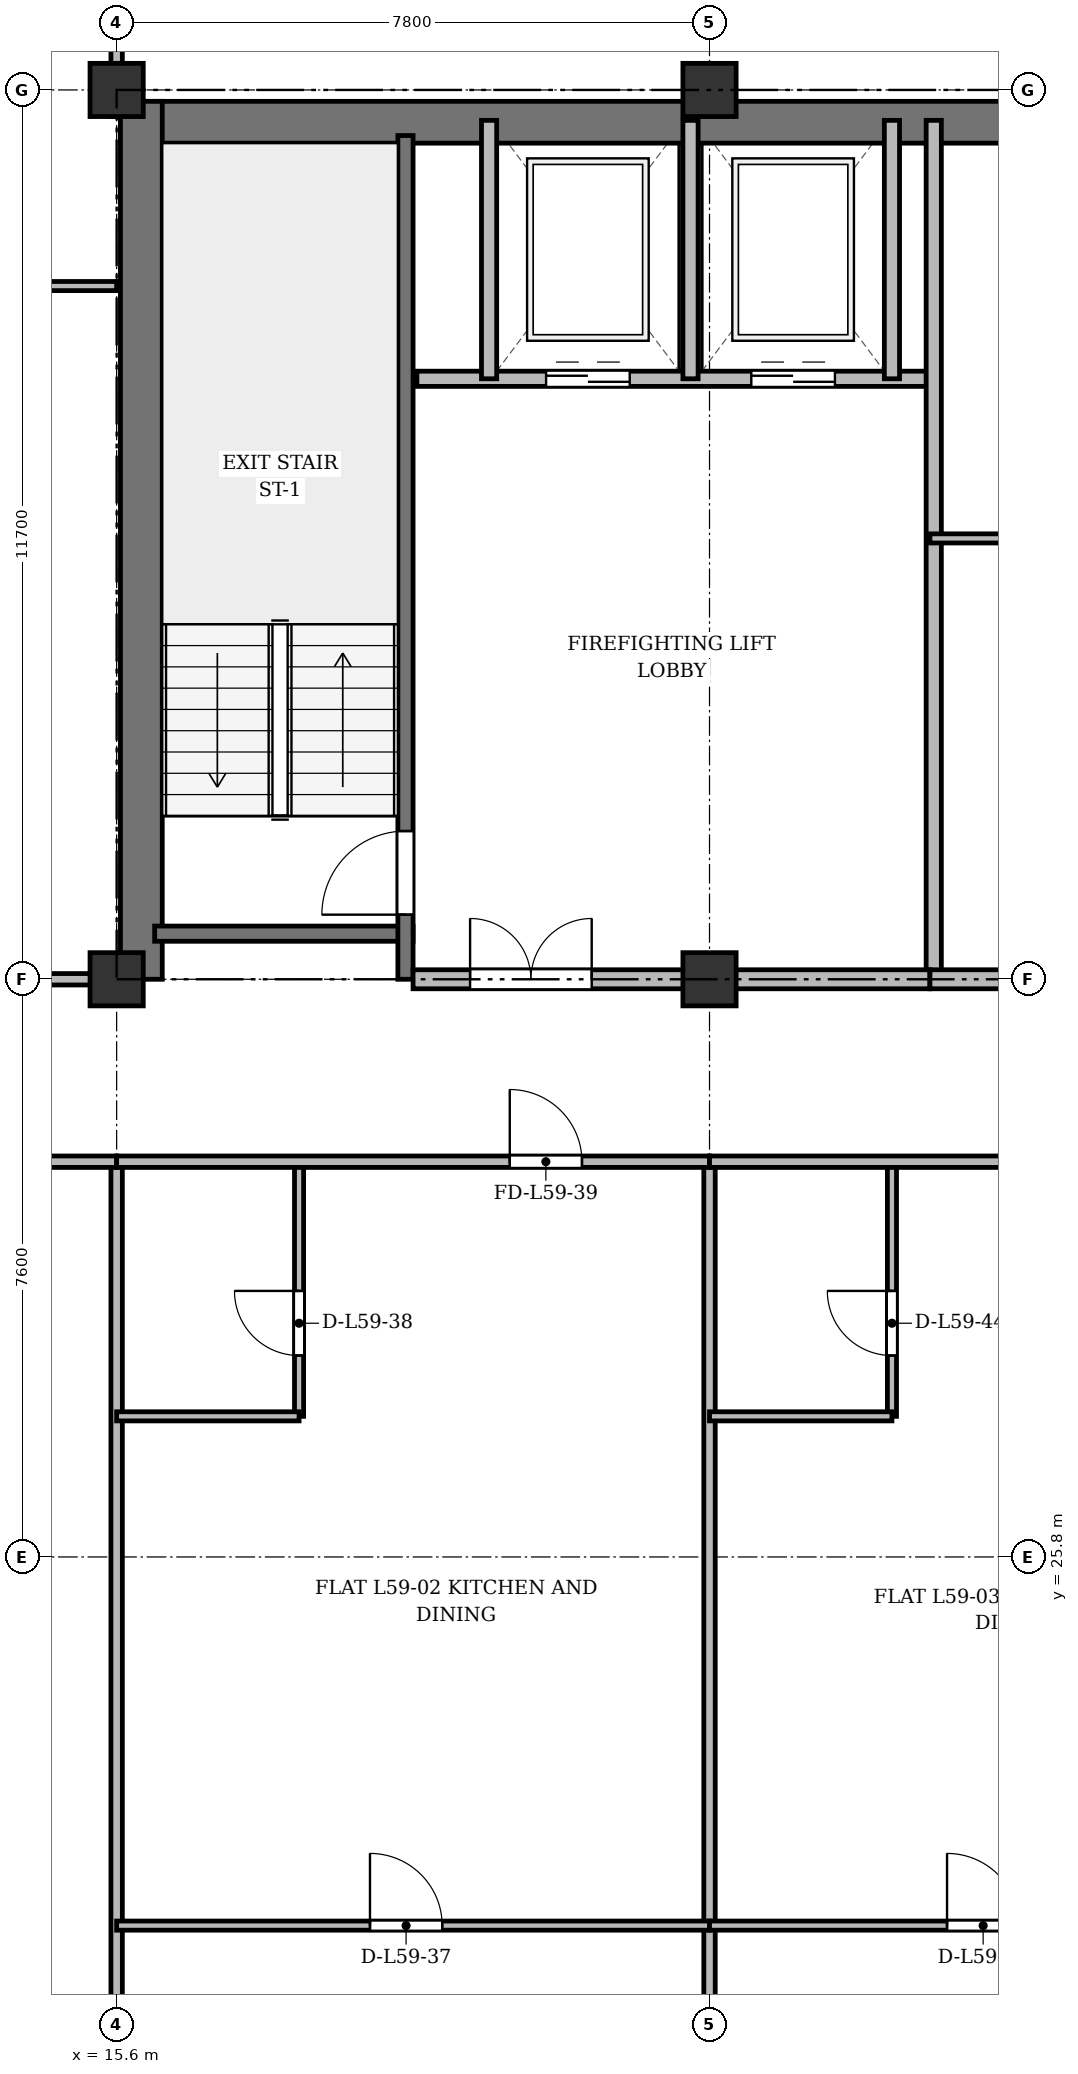
"""IFC4 building model, lengths in metres.
Left out: names, types, materials, properties, quantities, classifications, styles, units other than length and angle.
Written with IfcOpenShell. Run it as: python <this file> out.ifc"""

import sys

from ifc_helpers import new_model, si_unit, direction, frame, frame_2d, origin, origin_2d, place, context, subcontext, project, spatial, rectangle, extrude, source, transform, mapped, element, fill, save


model = new_model("IFC4")
c1 = context("Model", 3, precision=1e-05, world=origin(), true_north=direction((0.0, 1.0)))
c2 = subcontext(c1, "Body", "Model", "MODEL_VIEW")
j1 = project(units=[si_unit("LENGTHUNIT", "METRE"), si_unit("PLANEANGLEUNIT", "RADIAN")], contexts=[c1])
p1 = place(None, origin())
s1 = spatial("IfcSite", under=j1, at=p1, CompositionType="ELEMENT")
p2 = place(p1, origin())
s2 = spatial("IfcBuilding", under=s1, at=p2, CompositionType="ELEMENT")
p3 = place(p2, frame((0.0, 0.0, 226.5)))
s3 = spatial("IfcBuildingStorey", under=s2, at=p3, CompositionType="ELEMENT", Elevation=226.5)
m1 = source(origin(), c2, "Body", "SweptSolid", [
    extrude(rectangle(XDim=0.7, YDim=0.7, at=origin_2d()), origin(), (0.0, 0.0, 1.0), 3.6),
])
for number, where, z_axis, x_axis in (
    (1, (15.6, 33.4, 0.0), (0.0, 0.0, 1.0), (1.0, 0.0, 0.0)),
    (2, (15.6, 45.1, 0.0), (0.0, 0.0, 1.0), (1.0, 0.0, 0.0)),
    (3, (23.4, 33.4, 0.0), (0.0, 0.0, 1.0), (1.0, 0.0, 0.0)),
    (4, (23.4, 45.1, 0.0), (0.0, 0.0, 1.0), (1.0, 0.0, 0.0)),
):
    element("IfcColumn", number, at=place(p3, frame(where, z_axis=z_axis, x_axis=x_axis)), inside=s3, PredefinedType="COLUMN", context=c2, shape_type="MappedRepresentation", body=[
        mapped(m1, transform((0.0, 0.0, 0.0), x_axis=(1.0, 0.0, 0.0), y_axis=(0.0, 1.0, 0.0), z_axis=(0.0, 0.0, 1.0), scale=1.0)),
    ])
p4 = place(p3, frame((15.65, 44.675, 0.0), z_axis=(0.0, 0.0, 1.0), x_axis=(1.0, 0.0, 0.0)))
e5 = element("IfcWall", 5, at=p4, inside=s3, PredefinedType="SHEAR", context=c2, shape_type="SweptSolid", body=[
    extrude(rectangle(XDim=43.1, YDim=0.55, at=frame_2d((21.55, 0.0))), origin(), (0.0, 0.0, 1.0), 3.36),
])
p5 = place(p3, frame((15.925, 33.4, 0.0), z_axis=(0.0, 0.0, 1.0), x_axis=(0.0, 1.0, 0.0)))
e6 = element("IfcWall", 6, at=p5, inside=s3, PredefinedType="SHEAR", context=c2, shape_type="SweptSolid", body=[
    extrude(rectangle(XDim=11.55, YDim=0.55, at=frame_2d((5.775, 0.0))), origin(), (0.0, 0.0, 1.0), 3.36),
])
p6 = place(p3, frame((16.1, 34.0, 0.0), z_axis=(0.0, 0.0, 1.0), x_axis=(1.0, 0.0, 0.0)))
e7 = element("IfcWall", 7, at=p6, inside=s3, PredefinedType="SHEAR", context=c2, shape_type="SweptSolid", body=[
    extrude(rectangle(XDim=3.4, YDim=0.2, at=frame_2d((1.7, 0.0))), origin(), (0.0, 0.0, 1.0), 3.36),
])
p7 = place(p3, frame((19.4, 33.4, 0.0), z_axis=(0.0, 0.0, 1.0), x_axis=(0.0, 1.0, 0.0)))
e8 = element("IfcWall", 8, at=p7, inside=s3, PredefinedType="SHEAR", context=c2, shape_type="SweptSolid", body=[
    extrude(rectangle(XDim=11.1, YDim=0.2, at=frame_2d((5.55, 0.0))), origin(), (0.0, 0.0, 1.0), 3.36),
])
p8 = place(p7, frame((0.85, 0.0, 0.0)))
e9 = element("IfcOpeningElement", 9, at=p8, cuts=e8, PredefinedType="OPENING", context=c2, shape_type="SweptSolid", body=[
    extrude(rectangle(XDim=1.1, YDim=2.15, at=frame_2d((0.55, 1.075))), frame((0.0, 0.11, 0.0), z_axis=(0.0, -1.0, 0.0), x_axis=(1.0, 0.0, 0.0)), (0.0, 0.0, 1.0), 0.22),
])
p9 = place(p3, frame((19.55, 41.3, 0.0), z_axis=(0.0, 0.0, 1.0), x_axis=(1.0, 0.0, 0.0)))
e10 = element("IfcWall", 10, at=p9, inside=s3, PredefinedType="SOLIDWALL", context=c2, shape_type="SweptSolid", body=[
    extrude(rectangle(XDim=6.75, YDim=0.2, at=frame_2d((3.375, 0.0))), origin(), (0.0, 0.0, 1.0), 3.36),
])
p10 = place(p9, frame((1.7, 0.0, 0.0)))
e11 = element("IfcOpeningElement", 11, at=p10, cuts=e10, PredefinedType="OPENING", context=c2, shape_type="SweptSolid", body=[
    extrude(rectangle(XDim=1.1, YDim=2.15, at=frame_2d((0.55, 1.075))), frame((0.0, 0.11, 0.0), z_axis=(0.0, -1.0, 0.0), x_axis=(1.0, 0.0, 0.0)), (0.0, 0.0, 1.0), 0.22),
])
p11 = place(p9, frame((4.4, 0.0, 0.0)))
e12 = element("IfcOpeningElement", 12, at=p11, cuts=e10, PredefinedType="OPENING", context=c2, shape_type="SweptSolid", body=[
    extrude(rectangle(XDim=1.1, YDim=2.15, at=frame_2d((0.55, 1.075))), frame((0.0, 0.11, 0.0), z_axis=(0.0, -1.0, 0.0), x_axis=(1.0, 0.0, 0.0)), (0.0, 0.0, 1.0), 0.22),
])
for number, where, z_axis, x_axis in (
    (13, (20.5, 41.3, 0.0), (0.0, 0.0, 1.0), (0.0, 1.0, 0.0)),
    (14, (23.15, 41.3, 0.0), (0.0, 0.0, 1.0), (0.0, 1.0, 0.0)),
    (15, (25.8, 41.3, 0.0), (0.0, 0.0, 1.0), (0.0, 1.0, 0.0)),
):
    element("IfcWall", number, at=place(p3, frame(where, z_axis=z_axis, x_axis=x_axis)), inside=s3, PredefinedType="SOLIDWALL", context=c2, shape_type="SweptSolid", body=[
        extrude(rectangle(XDim=3.4, YDim=0.2, at=frame_2d((1.7, 0.0))), origin(), (0.0, 0.0, 1.0), 3.36),
    ])
p12 = place(p3, frame((26.35, 33.4, 0.0), z_axis=(0.0, 0.0, 1.0), x_axis=(0.0, 1.0, 0.0)))
e16 = element("IfcWall", 16, at=p12, inside=s3, PredefinedType="SOLIDWALL", context=c2, shape_type="SweptSolid", body=[
    extrude(rectangle(XDim=11.3, YDim=0.2, at=frame_2d((5.65, 0.0))), origin(), (0.0, 0.0, 1.0), 2.91),
])
p13 = place(p3, frame((19.5, 33.4, 0.0), z_axis=(0.0, 0.0, 1.0), x_axis=(1.0, 0.0, 0.0)))
e17 = element("IfcWall", 17, at=p13, inside=s3, PredefinedType="PARTITIONING", context=c2, shape_type="SweptSolid", body=[
    extrude(rectangle(XDim=6.8, YDim=0.25, at=frame_2d((3.4, 0.0))), origin(), (0.0, 0.0, 1.0), 2.91),
])
p14 = place(p13, frame((0.75, 0.0, 0.0)))
e18 = element("IfcOpeningElement", 18, at=p14, cuts=e17, PredefinedType="OPENING", context=c2, shape_type="SweptSolid", body=[
    extrude(rectangle(XDim=1.6, YDim=2.2, at=frame_2d((0.8, 1.1))), frame((0.0, 0.135, 0.0), z_axis=(0.0, -1.0, 0.0), x_axis=(1.0, 0.0, 0.0)), (0.0, 0.0, 1.0), 0.27),
])
p15 = place(p3, frame((26.3, 39.2, 0.0), z_axis=(0.0, 0.0, 1.0), x_axis=(1.0, 0.0, 0.0)))
e19 = element("IfcWall", 19, at=p15, inside=s3, PredefinedType="PARTITIONING", context=c2, shape_type="SweptSolid", body=[
    extrude(rectangle(XDim=7.0, YDim=0.12, at=frame_2d((3.5, 0.0))), origin(), (0.0, 0.0, 1.0), 2.86),
])
p16 = place(p15, frame((2.6, 0.0, 0.0)))
e20 = element("IfcOpeningElement", 20, at=p16, cuts=e19, PredefinedType="OPENING", context=c2, shape_type="SweptSolid", body=[
    extrude(rectangle(XDim=0.95, YDim=2.15, at=frame_2d((0.475, 1.075))), frame((0.0, 0.07, 0.0), z_axis=(0.0, -1.0, 0.0), x_axis=(1.0, 0.0, 0.0)), (0.0, 0.0, 1.0), 0.14),
])
p17 = place(p3, frame((26.3, 33.4, 0.0), z_axis=(0.0, 0.0, 1.0), x_axis=(1.0, 0.0, 0.0)))
e21 = element("IfcWall", 21, at=p17, inside=s3, PredefinedType="PARTITIONING", context=c2, shape_type="SweptSolid", body=[
    extrude(rectangle(XDim=7.0, YDim=0.25, at=frame_2d((3.5, 0.0))), origin(), (0.0, 0.0, 1.0), 2.91),
])
p18 = place(p17, frame((1.35, 0.0, 0.0)))
e22 = element("IfcOpeningElement", 22, at=p18, cuts=e21, PredefinedType="OPENING", context=c2, shape_type="SweptSolid", body=[
    extrude(rectangle(XDim=0.95, YDim=2.15, at=frame_2d((0.475, 1.075))), frame((0.0, 0.135, 0.0), z_axis=(0.0, -1.0, 0.0), x_axis=(1.0, 0.0, 0.0)), (0.0, 0.0, 1.0), 0.27),
])
p19 = place(p3, frame((11.925, 42.52, 0.0), z_axis=(0.0, 0.0, 1.0), x_axis=(1.0, 0.0, 0.0)))
e23 = element("IfcWall", 23, at=p19, inside=s3, PredefinedType="PARTITIONING", context=c2, shape_type="SweptSolid", body=[
    extrude(rectangle(XDim=3.675, YDim=0.12, at=frame_2d((1.837, 0.0))), origin(), (0.0, 0.0, 1.0), 2.86),
])
p20 = place(p19, frame((1.362, 0.0, 0.0)))
e24 = element("IfcOpeningElement", 24, at=p20, cuts=e23, PredefinedType="OPENING", context=c2, shape_type="SweptSolid", body=[
    extrude(rectangle(XDim=0.95, YDim=2.15, at=frame_2d((0.475, 1.075))), frame((0.0, 0.07, 0.0), z_axis=(0.0, -1.0, 0.0), x_axis=(1.0, 0.0, 0.0)), (0.0, 0.0, 1.0), 0.14),
])
p21 = place(p3, frame((8.25, 33.4, 0.0), z_axis=(0.0, 0.0, 1.0), x_axis=(1.0, 0.0, 0.0)))
e25 = element("IfcWall", 25, at=p21, inside=s3, PredefinedType="PARTITIONING", context=c2, shape_type="SweptSolid", body=[
    extrude(rectangle(XDim=7.35, YDim=0.15, at=frame_2d((3.675, 0.0))), origin(), (0.0, 0.0, 1.0), 2.91),
])
p22 = place(p21, frame((4.275, 0.0, 0.0)))
e26 = element("IfcOpeningElement", 26, at=p22, cuts=e25, PredefinedType="OPENING", context=c2, shape_type="SweptSolid", body=[
    extrude(rectangle(XDim=0.95, YDim=2.15, at=frame_2d((0.475, 1.075))), frame((0.0, 0.085, 0.0), z_axis=(0.0, -1.0, 0.0), x_axis=(1.0, 0.0, 0.0)), (0.0, 0.0, 1.0), 0.17),
])
p23 = place(p3, frame((15.6, 44.75, 0.0), z_axis=(0.0, 0.0, 1.0), x_axis=(0.0, 1.0, 0.0)))
e27 = element("IfcWall", 27, at=p23, inside=s3, PredefinedType="PARTITIONING", context=c2, shape_type="SweptSolid", body=[
    extrude(rectangle(XDim=3.61, YDim=0.15, at=frame_2d((1.805, 0.0))), origin(), (0.0, 0.0, 1.0), 2.86),
])
p24 = place(p23, frame((1.1, 0.0, 0.0)))
e28 = element("IfcOpeningElement", 28, at=p24, cuts=e27, PredefinedType="OPENING", context=c2, shape_type="SweptSolid", body=[
    extrude(rectangle(XDim=0.95, YDim=2.15, at=frame_2d((0.475, 1.075))), frame((0.0, 0.085, 0.0), z_axis=(0.0, -1.0, 0.0), x_axis=(1.0, 0.0, 0.0)), (0.0, 0.0, 1.0), 0.17),
])
for number, where, z_axis, x_axis in (
    (29, (15.6, 3.625, 0.0), (0.0, 0.0, 1.0), (0.0, 1.0, 0.0)),
    (30, (23.4, 3.625, 0.0), (0.0, 0.0, 1.0), (0.0, 1.0, 0.0)),
):
    element("IfcWall", number, at=place(p3, frame(where, z_axis=z_axis, x_axis=x_axis)), inside=s3, PredefinedType="PARTITIONING", context=c2, shape_type="SweptSolid", body=[
        extrude(rectangle(XDim=27.375, YDim=0.15, at=frame_2d((13.688, 0.0))), origin(), (0.0, 0.0, 1.0), 2.86),
    ])
p25 = place(p3, frame((8.225, 31.0, 0.0), z_axis=(0.0, 0.0, 1.0), x_axis=(1.0, 0.0, 0.0)))
e31 = element("IfcWall", 31, at=p25, inside=s3, PredefinedType="PARTITIONING", context=c2, shape_type="SweptSolid", body=[
    extrude(rectangle(XDim=7.375, YDim=0.15, at=frame_2d((3.688, 0.0))), origin(), (0.0, 0.0, 1.0), 2.86),
])
p26 = place(p25, frame((4.877, 0.0, 0.0)))
e32 = element("IfcOpeningElement", 32, at=p26, cuts=e31, PredefinedType="OPENING", context=c2, shape_type="SweptSolid", body=[
    extrude(rectangle(XDim=0.95, YDim=2.15, at=frame_2d((0.475, 1.075))), frame((0.0, 0.085, 0.0), z_axis=(0.0, -1.0, 0.0), x_axis=(1.0, 0.0, 0.0)), (0.0, 0.0, 1.0), 0.17),
])
p27 = place(p3, frame((15.6, 20.95, 0.0), z_axis=(0.0, 0.0, 1.0), x_axis=(1.0, 0.0, 0.0)))
e33 = element("IfcWall", 33, at=p27, inside=s3, PredefinedType="PARTITIONING", context=c2, shape_type="SweptSolid", body=[
    extrude(rectangle(XDim=7.8, YDim=0.12, at=frame_2d((3.9, 0.0))), origin(), (0.0, 0.0, 1.0), 2.86),
])
p28 = place(p27, frame((3.333, 0.0, 0.0)))
e34 = element("IfcOpeningElement", 34, at=p28, cuts=e33, PredefinedType="OPENING", context=c2, shape_type="SweptSolid", body=[
    extrude(rectangle(XDim=0.95, YDim=2.15, at=frame_2d((0.475, 1.075))), frame((0.0, 0.07, 0.0), z_axis=(0.0, -1.0, 0.0), x_axis=(1.0, 0.0, 0.0)), (0.0, 0.0, 1.0), 0.14),
])
p29 = place(p3, frame((18.0, 27.65, 0.0), z_axis=(0.0, 0.0, 1.0), x_axis=(0.0, 1.0, 0.0)))
e35 = element("IfcWall", 35, at=p29, inside=s3, PredefinedType="PARTITIONING", context=c2, shape_type="SweptSolid", body=[
    extrude(rectangle(XDim=3.35, YDim=0.12, at=frame_2d((1.675, 0.0))), origin(), (0.0, 0.0, 1.0), 3.36),
])
p30 = place(p29, frame((0.8, 0.0, 0.0)))
e36 = element("IfcOpeningElement", 36, at=p30, cuts=e35, PredefinedType="OPENING", context=c2, shape_type="SweptSolid", body=[
    extrude(rectangle(XDim=0.85, YDim=2.1, at=frame_2d((0.425, 1.05))), frame((0.0, 0.07, 0.0), z_axis=(0.0, -1.0, 0.0), x_axis=(1.0, 0.0, 0.0)), (0.0, 0.0, 1.0), 0.14),
])
p31 = place(p3, frame((15.6, 27.65, 0.0), z_axis=(0.0, 0.0, 1.0), x_axis=(1.0, 0.0, 0.0)))
e37 = element("IfcWall", 37, at=p31, inside=s3, PredefinedType="PARTITIONING", context=c2, shape_type="SweptSolid", body=[
    extrude(rectangle(XDim=2.4, YDim=0.12, at=frame_2d((1.2, 0.0))), origin(), (0.0, 0.0, 1.0), 2.86),
])
p32 = place(p3, frame((15.6, 31.0, 0.0), z_axis=(0.0, 0.0, 1.0), x_axis=(1.0, 0.0, 0.0)))
e38 = element("IfcWall", 38, at=p32, inside=s3, PredefinedType="PARTITIONING", context=c2, shape_type="SweptSolid", body=[
    extrude(rectangle(XDim=7.8, YDim=0.15, at=frame_2d((3.9, 0.0))), origin(), (0.0, 0.0, 1.0), 2.86),
])
p33 = place(p32, frame((5.172, 0.0, 0.0)))
e39 = element("IfcOpeningElement", 39, at=p33, cuts=e38, PredefinedType="OPENING", context=c2, shape_type="SweptSolid", body=[
    extrude(rectangle(XDim=0.95, YDim=2.15, at=frame_2d((0.475, 1.075))), frame((0.0, 0.085, 0.0), z_axis=(0.0, -1.0, 0.0), x_axis=(1.0, 0.0, 0.0)), (0.0, 0.0, 1.0), 0.17),
])
p34 = place(p3, frame((23.4, 20.95, 0.0), z_axis=(0.0, 0.0, 1.0), x_axis=(1.0, 0.0, 0.0)))
e40 = element("IfcWall", 40, at=p34, inside=s3, PredefinedType="PARTITIONING", context=c2, shape_type="SweptSolid", body=[
    extrude(rectangle(XDim=7.2, YDim=0.12, at=frame_2d((3.6, 0.0))), origin(), (0.0, 0.0, 1.0), 2.86),
])
p35 = place(p34, frame((3.125, 0.0, 0.0)))
e41 = element("IfcOpeningElement", 41, at=p35, cuts=e40, PredefinedType="OPENING", context=c2, shape_type="SweptSolid", body=[
    extrude(rectangle(XDim=0.95, YDim=2.15, at=frame_2d((0.475, 1.075))), frame((0.0, 0.07, 0.0), z_axis=(0.0, -1.0, 0.0), x_axis=(1.0, 0.0, 0.0)), (0.0, 0.0, 1.0), 0.14),
])
p36 = place(p3, frame((25.8, 27.65, 0.0), z_axis=(0.0, 0.0, 1.0), x_axis=(0.0, 1.0, 0.0)))
e42 = element("IfcWall", 42, at=p36, inside=s3, PredefinedType="PARTITIONING", context=c2, shape_type="SweptSolid", body=[
    extrude(rectangle(XDim=3.35, YDim=0.12, at=frame_2d((1.675, 0.0))), origin(), (0.0, 0.0, 1.0), 3.36),
])
p37 = place(p36, frame((0.8, 0.0, 0.0)))
e43 = element("IfcOpeningElement", 43, at=p37, cuts=e42, PredefinedType="OPENING", context=c2, shape_type="SweptSolid", body=[
    extrude(rectangle(XDim=0.85, YDim=2.1, at=frame_2d((0.425, 1.05))), frame((0.0, 0.07, 0.0), z_axis=(0.0, -1.0, 0.0), x_axis=(1.0, 0.0, 0.0)), (0.0, 0.0, 1.0), 0.14),
])
p38 = place(p3, frame((23.4, 27.65, 0.0), z_axis=(0.0, 0.0, 1.0), x_axis=(1.0, 0.0, 0.0)))
e44 = element("IfcWall", 44, at=p38, inside=s3, PredefinedType="PARTITIONING", context=c2, shape_type="SweptSolid", body=[
    extrude(rectangle(XDim=2.4, YDim=0.12, at=frame_2d((1.2, 0.0))), origin(), (0.0, 0.0, 1.0), 2.86),
])
p39 = place(p3, frame((23.4, 31.0, 0.0), z_axis=(0.0, 0.0, 1.0), x_axis=(1.0, 0.0, 0.0)))
e45 = element("IfcWall", 45, at=p39, inside=s3, PredefinedType="PARTITIONING", context=c2, shape_type="SweptSolid", body=[
    extrude(rectangle(XDim=7.2, YDim=0.15, at=frame_2d((3.6, 0.0))), origin(), (0.0, 0.0, 1.0), 2.86),
])
p40 = place(p39, frame((4.706, 0.0, 0.0)))
e46 = element("IfcOpeningElement", 46, at=p40, cuts=e45, PredefinedType="OPENING", context=c2, shape_type="SweptSolid", body=[
    extrude(rectangle(XDim=0.95, YDim=2.15, at=frame_2d((0.475, 1.075))), frame((0.0, 0.085, 0.0), z_axis=(0.0, -1.0, 0.0), x_axis=(1.0, 0.0, 0.0)), (0.0, 0.0, 1.0), 0.17),
])
m2 = source(origin(), c2, "Body", "SweptSolid", [
    extrude(rectangle(XDim=1.1, YDim=2.15, at=frame_2d((0.55, 1.075))), frame((0.0, 0.025, 0.0), z_axis=(0.0, -1.0, 0.0), x_axis=(1.0, 0.0, 0.0)), (0.0, 0.0, 1.0), 0.05),
])
p41 = place(p8, origin())
e47 = element("IfcDoor", 47, at=p41, inside=s3, OperationType="SINGLE_SWING_LEFT", PredefinedType="DOOR", context=c2, shape_type="MappedRepresentation", body=[
    mapped(m2, transform((0.0, 0.0, 0.0), x_axis=(1.0, 0.0, 0.0), y_axis=(0.0, 1.0, 0.0), z_axis=(0.0, 0.0, 1.0), scale=1.0)),
])
fill(e9, e47)
p42 = place(p10, origin())
e48 = element("IfcDoor", 48, at=p42, inside=s3, OperationType="DOUBLE_DOOR_SLIDING", PredefinedType="DOOR", context=c2, shape_type="MappedRepresentation", body=[
    mapped(m2, transform((0.0, 0.0, 0.0), x_axis=(1.0, 0.0, 0.0), y_axis=(0.0, 1.0, 0.0), z_axis=(0.0, 0.0, 1.0), scale=1.0)),
])
fill(e11, e48)
p43 = place(p11, origin())
e49 = element("IfcDoor", 49, at=p43, inside=s3, OperationType="DOUBLE_DOOR_SLIDING", PredefinedType="DOOR", context=c2, shape_type="MappedRepresentation", body=[
    mapped(m2, transform((0.0, 0.0, 0.0), x_axis=(1.0, 0.0, 0.0), y_axis=(0.0, 1.0, 0.0), z_axis=(0.0, 0.0, 1.0), scale=1.0)),
])
fill(e12, e49)
m3 = source(origin(), c2, "Body", "SweptSolid", [
    extrude(rectangle(XDim=1.6, YDim=2.2, at=frame_2d((0.8, 1.1))), frame((0.0, 0.025, 0.0), z_axis=(0.0, -1.0, 0.0), x_axis=(1.0, 0.0, 0.0)), (0.0, 0.0, 1.0), 0.05),
])
p44 = place(p14, origin())
e50 = element("IfcDoor", 50, at=p44, inside=s3, OperationType="DOUBLE_DOOR_SINGLE_SWING", PredefinedType="DOOR", context=c2, shape_type="MappedRepresentation", body=[
    mapped(m3, transform((0.0, 0.0, 0.0), x_axis=(1.0, 0.0, 0.0), y_axis=(0.0, 1.0, 0.0), z_axis=(0.0, 0.0, 1.0), scale=1.0)),
])
fill(e18, e50)
m4 = source(origin(), c2, "Body", "SweptSolid", [
    extrude(rectangle(XDim=0.95, YDim=2.15, at=frame_2d((0.475, 1.075))), frame((0.0, 0.025, 0.0), z_axis=(0.0, -1.0, 0.0), x_axis=(1.0, 0.0, 0.0)), (0.0, 0.0, 1.0), 0.05),
])
p45 = place(p28, origin())
e51 = element("IfcDoor", 51, at=p45, inside=s3, OperationType="SINGLE_SWING_LEFT", PredefinedType="DOOR", context=c2, shape_type="MappedRepresentation", body=[
    mapped(m4, transform((0.0, 0.0, 0.0), x_axis=(1.0, 0.0, 0.0), y_axis=(0.0, 1.0, 0.0), z_axis=(0.0, 0.0, 1.0), scale=1.0)),
])
fill(e34, e51)
m5 = source(origin(), c2, "Body", "SweptSolid", [
    extrude(rectangle(XDim=0.85, YDim=2.1, at=frame_2d((0.425, 1.05))), frame((0.0, 0.025, 0.0), z_axis=(0.0, -1.0, 0.0), x_axis=(1.0, 0.0, 0.0)), (0.0, 0.0, 1.0), 0.05),
])
p46 = place(p30, origin())
e52 = element("IfcDoor", 52, at=p46, inside=s3, OperationType="SINGLE_SWING_RIGHT", PredefinedType="DOOR", context=c2, shape_type="MappedRepresentation", body=[
    mapped(m5, transform((0.0, 0.0, 0.0), x_axis=(1.0, 0.0, 0.0), y_axis=(0.0, 1.0, 0.0), z_axis=(0.0, 0.0, 1.0), scale=1.0)),
])
fill(e36, e52)
p47 = place(p33, origin())
e53 = element("IfcDoor", 53, at=p47, inside=s3, OperationType="SINGLE_SWING_LEFT", PredefinedType="DOOR", context=c2, shape_type="MappedRepresentation", body=[
    mapped(m4, transform((0.0, 0.0, 0.0), x_axis=(1.0, 0.0, 0.0), y_axis=(0.0, 1.0, 0.0), z_axis=(0.0, 0.0, 1.0), scale=1.0)),
])
fill(e39, e53)
p48 = place(p35, origin())
e54 = element("IfcDoor", 54, at=p48, inside=s3, OperationType="SINGLE_SWING_LEFT", PredefinedType="DOOR", context=c2, shape_type="MappedRepresentation", body=[
    mapped(m4, transform((0.0, 0.0, 0.0), x_axis=(1.0, 0.0, 0.0), y_axis=(0.0, 1.0, 0.0), z_axis=(0.0, 0.0, 1.0), scale=1.0)),
])
fill(e41, e54)
p49 = place(p37, origin())
e55 = element("IfcDoor", 55, at=p49, inside=s3, OperationType="SINGLE_SWING_RIGHT", PredefinedType="DOOR", context=c2, shape_type="MappedRepresentation", body=[
    mapped(m5, transform((0.0, 0.0, 0.0), x_axis=(1.0, 0.0, 0.0), y_axis=(0.0, 1.0, 0.0), z_axis=(0.0, 0.0, 1.0), scale=1.0)),
])
fill(e43, e55)
save(model, sys.argv[1])
